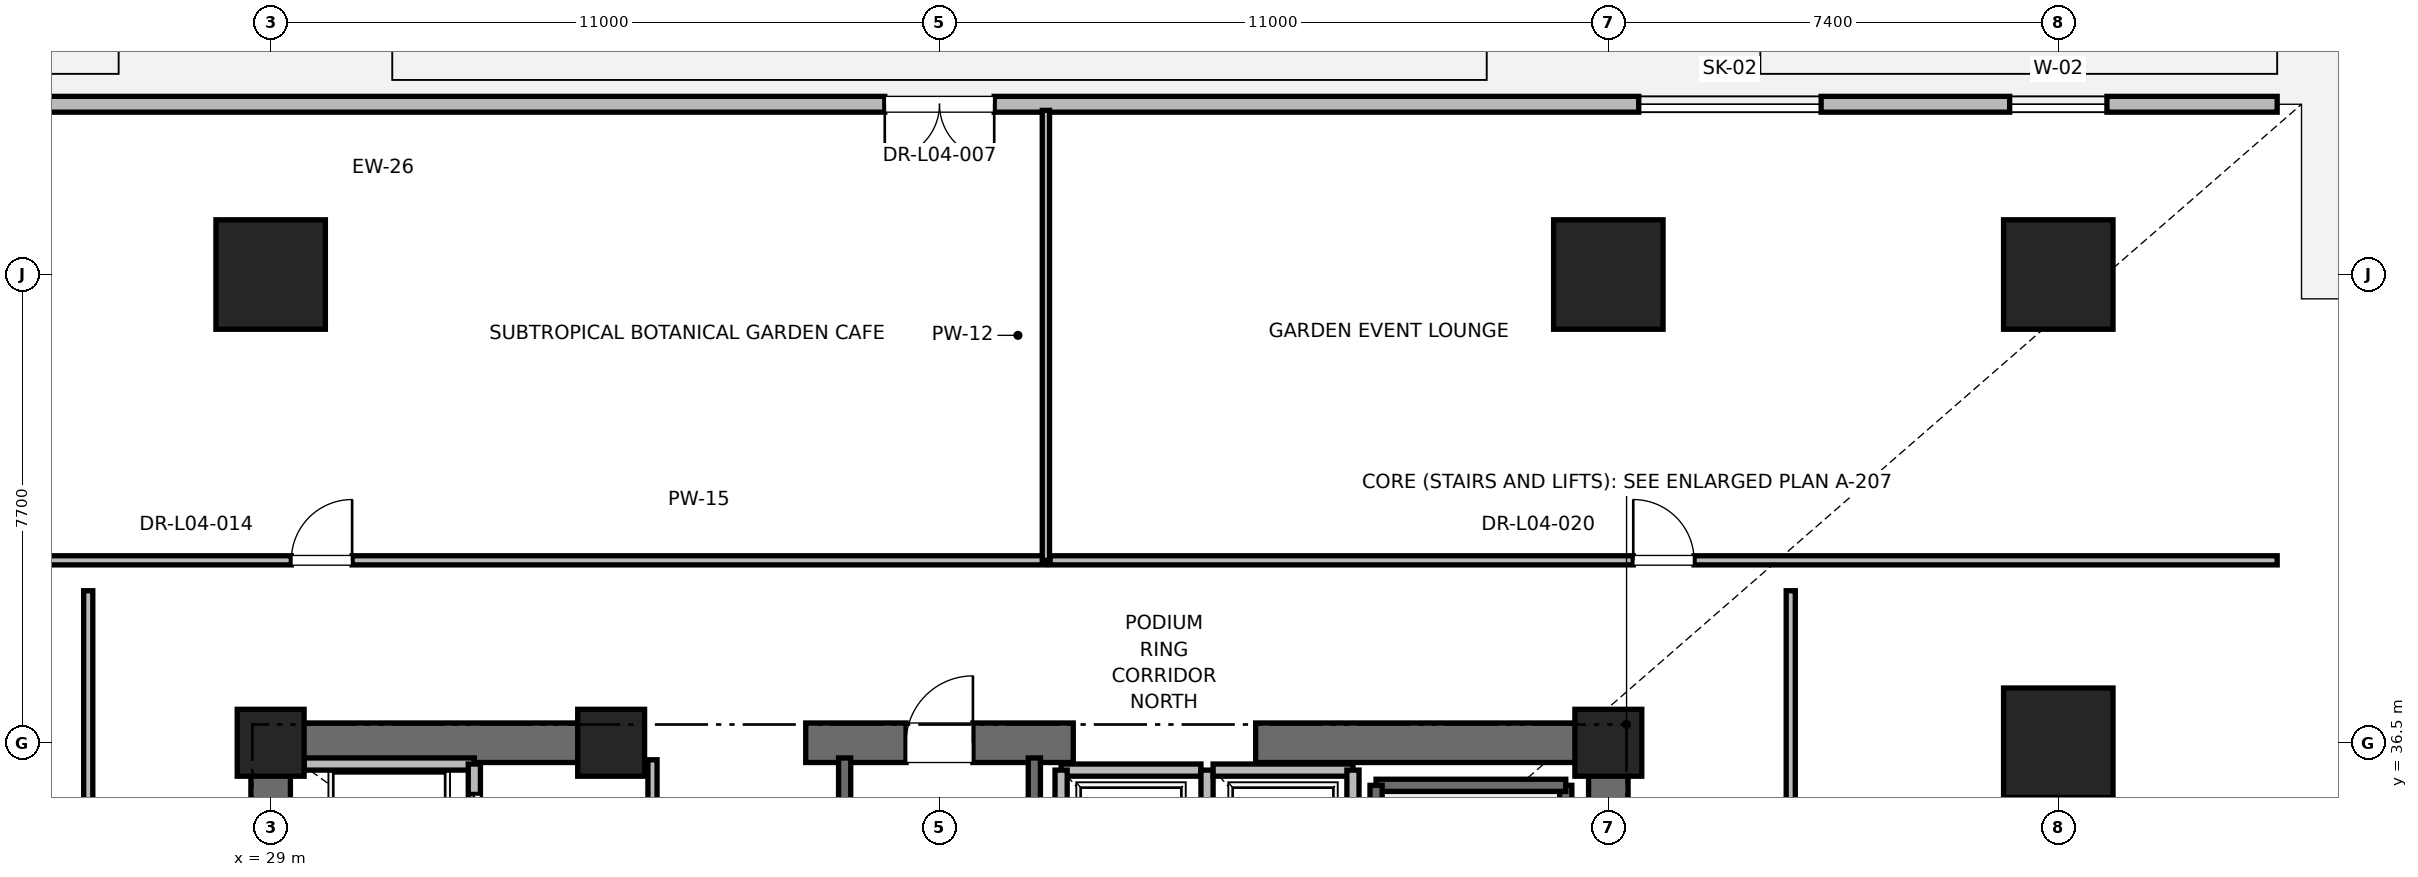
"""IFC4 building model, lengths in metres.
Left out: names, types, materials, properties, quantities, classifications, styles, units other than length and angle.
Written with IfcOpenShell. Run it as: python <this file> out.ifc"""

import sys

from ifc_helpers import new_model, si_unit, direction, frame, frame_2d, origin, origin_2d, place, context, subcontext, project, spatial, rectangle, extrude, element, fill, save


model = new_model("IFC4")
c1 = context("Model", 3, precision=1e-05, world=origin(), true_north=direction((0.0, 1.0)))
c2 = subcontext(c1, "Body", "Model", "MODEL_VIEW")
j1 = project(units=[si_unit("LENGTHUNIT", "METRE"), si_unit("PLANEANGLEUNIT", "RADIAN")], contexts=[c1])
p1 = place(None, origin())
s1 = spatial("IfcSite", under=j1, at=p1, CompositionType="ELEMENT")
p2 = place(p1, origin())
s2 = spatial("IfcBuilding", under=s1, at=p2, CompositionType="ELEMENT")
p3 = place(p2, frame((0.0, 0.0, 21.6)))
s3 = spatial("IfcBuildingStorey", under=s2, at=p3, CompositionType="ELEMENT", Elevation=21.6)
for number, where, z_axis, x_axis in (
    (1, (29.0, 44.2, 0.0), (0.0, 0.0, 1.0), (1.0, 0.0, 0.0)),
    (2, (51.0, 44.2, 0.0), (0.0, 0.0, 1.0), (1.0, 0.0, 0.0)),
    (3, (58.4, 36.5, 0.0), (0.0, 0.0, 1.0), (1.0, 0.0, 0.0)),
    (4, (58.4, 44.2, 0.0), (0.0, 0.0, 1.0), (1.0, 0.0, 0.0)),
):
    element("IfcColumn", number, at=place(p3, frame(where, z_axis=z_axis, x_axis=x_axis)), inside=s3, PredefinedType="COLUMN", context=c2, shape_type="SweptSolid", body=[
        extrude(rectangle(XDim=1.8, YDim=1.8, at=origin_2d()), origin(), (0.0, 0.0, 1.0), 6.0),
    ])
for number, where, z_axis, x_axis in (
    (5, (29.0, 36.5, 0.0), (0.0, 0.0, 1.0), (1.0, 0.0, 0.0)),
    (6, (51.0, 36.5, 0.0), (0.0, 0.0, 1.0), (1.0, 0.0, 0.0)),
    (7, (34.6, 36.5, 0.0), (0.0, 0.0, 1.0), (1.0, 0.0, 0.0)),
):
    element("IfcColumn", number, at=place(p3, frame(where, z_axis=z_axis, x_axis=x_axis)), inside=s3, PredefinedType="PILASTER", context=c2, shape_type="SweptSolid", body=[
        extrude(rectangle(XDim=1.1, YDim=1.1, at=origin_2d()), origin(), (0.0, 0.0, 1.0), 6.0),
    ])
p4 = place(p3, frame((29.0, 36.5, 0.0), z_axis=(0.0, 0.0, 1.0), x_axis=(1.0, 0.0, 0.0)))
e8 = element("IfcWall", 8, at=p4, inside=s3, PredefinedType="SHEAR", context=c2, shape_type="SweptSolid", body=[
    extrude(rectangle(XDim=5.8, YDim=0.65, at=frame_2d((2.9, 0.0))), origin(), (0.0, 0.0, 1.0), 5.76),
])
p5 = place(p3, frame((37.8, 36.5, 0.0), z_axis=(0.0, 0.0, 1.0), x_axis=(1.0, 0.0, 0.0)))
e9 = element("IfcWall", 9, at=p5, inside=s3, PredefinedType="SHEAR", context=c2, shape_type="SweptSolid", body=[
    extrude(rectangle(XDim=4.4, YDim=0.65, at=frame_2d((2.2, 0.0))), origin(), (0.0, 0.0, 1.0), 5.76),
])
p6 = place(p5, frame((1.65, 0.0, 0.0)))
e10 = element("IfcOpeningElement", 10, at=p6, cuts=e9, PredefinedType="OPENING", context=c2, shape_type="SweptSolid", body=[
    extrude(rectangle(XDim=1.1, YDim=2.15, at=frame_2d((0.55, 1.075))), frame((0.0, 0.325, 0.0), z_axis=(0.0, -1.0, 0.0), x_axis=(1.0, 0.0, 0.0)), (0.0, 0.0, 1.0), 0.65),
])
for number, where, z_axis, x_axis in (
    (11, (45.2, 36.5, 0.0), (0.0, 0.0, 1.0), (1.0, 0.0, 0.0)),
    (12, (29.0, 30.7, 0.0), (0.0, 0.0, 1.0), (0.0, 1.0, 0.0)),
):
    element("IfcWall", number, at=place(p3, frame(where, z_axis=z_axis, x_axis=x_axis)), inside=s3, PredefinedType="SHEAR", context=c2, shape_type="SweptSolid", body=[
        extrude(rectangle(XDim=5.8, YDim=0.65, at=frame_2d((2.9, 0.0))), origin(), (0.0, 0.0, 1.0), 5.76),
    ])
p7 = place(p3, frame((51.0, 27.7, 0.0), z_axis=(0.0, 0.0, 1.0), x_axis=(0.0, 1.0, 0.0)))
e13 = element("IfcWall", 13, at=p7, inside=s3, PredefinedType="SHEAR", context=c2, shape_type="SweptSolid", body=[
    extrude(rectangle(XDim=8.8, YDim=0.65, at=frame_2d((4.4, 0.0))), origin(), (0.0, 0.0, 1.0), 5.76),
])
p8 = place(p3, frame((62.0, 47.0, 0.0), z_axis=(0.0, 0.0, 1.0), x_axis=(-1.0, 0.0, 0.0)))
e14 = element("IfcWall", 14, at=p8, inside=s3, PredefinedType="PARAPET", context=c2, shape_type="SweptSolid", body=[
    extrude(rectangle(XDim=44.0, YDim=0.26, at=frame_2d((22.0, 0.0))), origin(), (0.0, 0.0, 1.0), 4.889),
])
p9 = place(p8, frame((2.8, 0.0, 0.9)))
e15 = element("IfcOpeningElement", 15, at=p9, cuts=e14, PredefinedType="OPENING", context=c2, shape_type="SweptSolid", body=[
    extrude(rectangle(XDim=1.6, YDim=2.1, at=frame_2d((0.8, 1.05))), frame((0.0, 0.13, 0.0), z_axis=(0.0, -1.0, 0.0), x_axis=(1.0, 0.0, 0.0)), (0.0, 0.0, 1.0), 0.26),
])
p10 = place(p8, frame((7.5, 0.0, 2.85)))
e16 = element("IfcOpeningElement", 16, at=p10, cuts=e14, PredefinedType="OPENING", context=c2, shape_type="SweptSolid", body=[
    extrude(rectangle(XDim=3.0, YDim=1.4, at=frame_2d((1.5, 0.7))), frame((0.0, 0.13, 0.0), z_axis=(0.0, -1.0, 0.0), x_axis=(1.0, 0.0, 0.0)), (0.0, 0.0, 1.0), 0.26),
])
p11 = place(p8, frame((21.1, 0.0, 0.0)))
e17 = element("IfcOpeningElement", 17, at=p11, cuts=e14, PredefinedType="OPENING", context=c2, shape_type="SweptSolid", body=[
    extrude(rectangle(XDim=1.8, YDim=2.4, at=frame_2d((0.9, 1.2))), frame((0.0, 0.13, 0.0), z_axis=(0.0, -1.0, 0.0), x_axis=(1.0, 0.0, 0.0)), (0.0, 0.0, 1.0), 0.26),
])
p12 = place(p8, frame((39.4, 0.0, 0.95)))
e18 = element("IfcOpeningElement", 18, at=p12, cuts=e14, PredefinedType="OPENING", context=c2, shape_type="SweptSolid", body=[
    extrude(rectangle(XDim=1.4, YDim=2.0, at=frame_2d((0.7, 1.0))), frame((0.0, 0.13, 0.0), z_axis=(0.0, -1.0, 0.0), x_axis=(1.0, 0.0, 0.0)), (0.0, 0.0, 1.0), 0.26),
])
p13 = place(p3, frame((50.3, 27.65, 0.0), z_axis=(0.0, 0.0, 1.0), x_axis=(0.0, 1.0, 0.0)))
e19 = element("IfcWall", 19, at=p13, inside=s3, PredefinedType="SOLIDWALL", context=c2, shape_type="SweptSolid", body=[
    extrude(rectangle(XDim=8.15, YDim=0.2, at=frame_2d((4.075, 0.0))), origin(), (0.0, 0.0, 1.0), 5.76),
])
p14 = place(p3, frame((47.18, 35.8, 0.0), z_axis=(0.0, 0.0, 1.0), x_axis=(1.0, 0.0, 0.0)))
e20 = element("IfcWall", 20, at=p14, inside=s3, PredefinedType="SOLIDWALL", context=c2, shape_type="SweptSolid", body=[
    extrude(rectangle(XDim=3.12, YDim=0.2, at=frame_2d((1.56, 0.0))), origin(), (0.0, 0.0, 1.0), 5.76),
])
p15 = place(p3, frame((47.18, 27.62, 0.0), z_axis=(0.0, 0.0, 1.0), x_axis=(0.0, 1.0, 0.0)))
e21 = element("IfcWall", 21, at=p15, inside=s3, PredefinedType="SOLIDWALL", context=c2, shape_type="SweptSolid", body=[
    extrude(rectangle(XDim=8.18, YDim=0.2, at=frame_2d((4.09, 0.0))), origin(), (0.0, 0.0, 1.0), 5.76),
])
p16 = place(p3, frame((38.44, 27.38, 0.0), z_axis=(0.0, 0.0, 1.0), x_axis=(0.0, 1.0, 0.0)))
e22 = element("IfcWall", 22, at=p16, inside=s3, PredefinedType="SOLIDWALL", context=c2, shape_type="SweptSolid", body=[
    extrude(rectangle(XDim=8.87, YDim=0.2, at=frame_2d((4.435, 0.0))), origin(), (0.0, 0.0, 1.0), 5.76),
])
p17 = place(p3, frame((41.56, 27.68, 0.0), z_axis=(0.0, 0.0, 1.0), x_axis=(0.0, 1.0, 0.0)))
e23 = element("IfcWall", 23, at=p17, inside=s3, PredefinedType="SOLIDWALL", context=c2, shape_type="SweptSolid", body=[
    extrude(rectangle(XDim=8.57, YDim=0.2, at=frame_2d((4.285, 0.0))), origin(), (0.0, 0.0, 1.0), 5.76),
])
p18 = place(p3, frame((32.35, 36.15, 0.0), z_axis=(0.0, 0.0, 1.0), x_axis=(-1.0, 0.0, 0.0)))
e24 = element("IfcWall", 24, at=p18, inside=s3, PredefinedType="SOLIDWALL", context=c2, shape_type="SweptSolid", body=[
    extrude(rectangle(XDim=2.8, YDim=0.2, at=frame_2d((1.4, 0.0))), origin(), (0.0, 0.0, 1.0), 4.889),
])
p19 = place(p3, frame((32.35, 34.05, 0.0), z_axis=(0.0, 0.0, 1.0), x_axis=(0.0, 1.0, 0.0)))
e25 = element("IfcWall", 25, at=p19, inside=s3, PredefinedType="SOLIDWALL", context=c2, shape_type="SweptSolid", body=[
    extrude(rectangle(XDim=2.1, YDim=0.2, at=frame_2d((1.05, 0.0))), origin(), (0.0, 0.0, 1.0), 5.76),
])
p20 = place(p19, frame((0.5, 0.0, 0.0)))
e26 = element("IfcOpeningElement", 26, at=p20, cuts=e25, PredefinedType="OPENING", context=c2, shape_type="SweptSolid", body=[
    extrude(rectangle(XDim=1.1, YDim=2.2, at=frame_2d((0.55, 1.1))), frame((0.0, 0.1, 0.0), z_axis=(0.0, -1.0, 0.0), x_axis=(1.0, 0.0, 0.0)), (0.0, 0.0, 1.0), 0.2),
])
p21 = place(p3, frame((44.3, 36.05, 0.0), z_axis=(0.0, 0.0, 1.0), x_axis=(-1.0, 0.0, 0.0)))
e27 = element("IfcWall", 27, at=p21, inside=s3, PredefinedType="SOLIDWALL", context=c2, shape_type="SweptSolid", body=[
    extrude(rectangle(XDim=2.3, YDim=0.2, at=frame_2d((1.15, 0.0))), origin(), (0.0, 0.0, 1.0), 4.54),
])
for number, where, z_axis, x_axis in (
    (28, (42.0, 36.05, 0.0), (0.0, 0.0, 1.0), (0.0, -1.0, 0.0)),
    (29, (44.4, 33.45, 0.0), (0.0, 0.0, 1.0), (0.0, 1.0, 0.0)),
):
    element("IfcWall", number, at=place(p3, frame(where, z_axis=z_axis, x_axis=x_axis)), inside=s3, PredefinedType="SOLIDWALL", context=c2, shape_type="SweptSolid", body=[
        extrude(rectangle(XDim=2.6, YDim=0.2, at=frame_2d((1.3, 0.0))), origin(), (0.0, 0.0, 1.0), 4.54),
    ])
p22 = place(p3, frame((46.8, 36.05, 0.0), z_axis=(0.0, 0.0, 1.0), x_axis=(-1.0, 0.0, 0.0)))
e30 = element("IfcWall", 30, at=p22, inside=s3, PredefinedType="SOLIDWALL", context=c2, shape_type="SweptSolid", body=[
    extrude(rectangle(XDim=2.3, YDim=0.2, at=frame_2d((1.15, 0.0))), origin(), (0.0, 0.0, 1.0), 4.54),
])
p23 = place(p3, frame((46.8, 33.45, 0.0), z_axis=(0.0, 0.0, 1.0), x_axis=(0.0, 1.0, 0.0)))
e31 = element("IfcWall", 31, at=p23, inside=s3, PredefinedType="SOLIDWALL", context=c2, shape_type="SweptSolid", body=[
    extrude(rectangle(XDim=2.6, YDim=0.2, at=frame_2d((1.3, 0.0))), origin(), (0.0, 0.0, 1.0), 5.76),
])
p24 = place(p3, frame((35.28, 33.95, 0.0), z_axis=(0.0, 0.0, 1.0), x_axis=(0.0, 1.0, 0.0)))
e32 = element("IfcWall", 32, at=p24, inside=s3, PredefinedType="PARTITIONING", context=c2, shape_type="SweptSolid", body=[
    extrude(rectangle(XDim=2.27, YDim=0.15, at=frame_2d((1.135, 0.0))), origin(), (0.0, 0.0, 1.0), 2.85),
])
p25 = place(p24, frame((0.66, 0.0, 0.0)))
e33 = element("IfcOpeningElement", 33, at=p25, cuts=e32, PredefinedType="OPENING", context=c2, shape_type="SweptSolid", body=[
    extrude(rectangle(XDim=0.95, YDim=2.15, at=frame_2d((0.475, 1.075))), frame((0.0, 0.075, 0.0), z_axis=(0.0, -1.0, 0.0), x_axis=(1.0, 0.0, 0.0)), (0.0, 0.0, 1.0), 0.15),
])
p26 = place(p3, frame((18.0, 39.5, 0.0), z_axis=(0.0, 0.0, 1.0), x_axis=(1.0, 0.0, 0.0)))
e34 = element("IfcWall", 34, at=p26, inside=s3, PredefinedType="PARTITIONING", context=c2, shape_type="SweptSolid", body=[
    extrude(rectangle(XDim=23.75, YDim=0.15, at=frame_2d((11.875, 0.0))), origin(), (0.0, 0.0, 1.0), 2.85),
])
p27 = place(p26, frame((11.34, 0.0, 0.0)))
e35 = element("IfcOpeningElement", 35, at=p27, cuts=e34, PredefinedType="OPENING", context=c2, shape_type="SweptSolid", body=[
    extrude(rectangle(XDim=1.0, YDim=2.15, at=frame_2d((0.5, 1.075))), frame((0.0, 0.075, 0.0), z_axis=(0.0, -1.0, 0.0), x_axis=(1.0, 0.0, 0.0)), (0.0, 0.0, 1.0), 0.15),
])
p28 = place(p3, frame((41.75, 39.5, 0.0), z_axis=(0.0, 0.0, 1.0), x_axis=(0.0, 1.0, 0.0)))
e36 = element("IfcWall", 36, at=p28, inside=s3, PredefinedType="PARTITIONING", context=c2, shape_type="SweptSolid", body=[
    extrude(rectangle(XDim=7.4, YDim=0.12, at=frame_2d((3.7, 0.0))), origin(), (0.0, 0.0, 1.0), 2.85),
])
p29 = place(p3, frame((41.82, 39.5, 0.0), z_axis=(0.0, 0.0, 1.0), x_axis=(1.0, 0.0, 0.0)))
e37 = element("IfcWall", 37, at=p29, inside=s3, PredefinedType="PARTITIONING", context=c2, shape_type="SweptSolid", body=[
    extrude(rectangle(XDim=20.18, YDim=0.15, at=frame_2d((10.09, 0.0))), origin(), (0.0, 0.0, 1.0), 2.85),
])
p30 = place(p29, frame((9.59, 0.0, 0.0)))
e38 = element("IfcOpeningElement", 38, at=p30, cuts=e37, PredefinedType="OPENING", context=c2, shape_type="SweptSolid", body=[
    extrude(rectangle(XDim=1.0, YDim=2.15, at=frame_2d((0.5, 1.075))), frame((0.0, 0.075, 0.0), z_axis=(0.0, -1.0, 0.0), x_axis=(1.0, 0.0, 0.0)), (0.0, 0.0, 1.0), 0.15),
])
p31 = place(p3, frame((26.0, 16.0, 0.0), z_axis=(0.0, 0.0, 1.0), x_axis=(0.0, 1.0, 0.0)))
e39 = element("IfcWall", 39, at=p31, inside=s3, PredefinedType="PARTITIONING", context=c2, shape_type="SweptSolid", body=[
    extrude(rectangle(XDim=23.0, YDim=0.15, at=frame_2d((11.5, 0.0))), origin(), (0.0, 0.0, 1.0), 2.85),
])
p32 = place(p31, frame((11.0, 0.0, 0.0)))
e40 = element("IfcOpeningElement", 40, at=p32, cuts=e39, PredefinedType="OPENING", context=c2, shape_type="SweptSolid", body=[
    extrude(rectangle(XDim=1.0, YDim=2.15, at=frame_2d((0.5, 1.075))), frame((0.0, 0.075, 0.0), z_axis=(0.0, -1.0, 0.0), x_axis=(1.0, 0.0, 0.0)), (0.0, 0.0, 1.0), 0.15),
])
p33 = place(p3, frame((54.0, 16.0, 0.0), z_axis=(0.0, 0.0, 1.0), x_axis=(0.0, 1.0, 0.0)))
e41 = element("IfcWall", 41, at=p33, inside=s3, PredefinedType="PARTITIONING", context=c2, shape_type="SweptSolid", body=[
    extrude(rectangle(XDim=23.0, YDim=0.15, at=frame_2d((11.5, 0.0))), origin(), (0.0, 0.0, 1.0), 2.85),
])
p34 = place(p33, frame((11.0, 0.0, 0.0)))
e42 = element("IfcOpeningElement", 42, at=p34, cuts=e41, PredefinedType="OPENING", context=c2, shape_type="SweptSolid", body=[
    extrude(rectangle(XDim=1.0, YDim=2.15, at=frame_2d((0.5, 1.075))), frame((0.0, 0.075, 0.0), z_axis=(0.0, -1.0, 0.0), x_axis=(1.0, 0.0, 0.0)), (0.0, 0.0, 1.0), 0.15),
])
p35 = place(p9, origin())
e43 = element("IfcWindow", 43, at=p35, inside=s3, PartitioningType="SINGLE_PANEL", PredefinedType="WINDOW", context=c2, shape_type="SweptSolid", body=[
    extrude(rectangle(XDim=1.6, YDim=2.1, at=frame_2d((0.8, 1.05))), frame((0.0, 0.03, 0.0), z_axis=(0.0, -1.0, 0.0), x_axis=(1.0, 0.0, 0.0)), (0.0, 0.0, 1.0), 0.06),
])
fill(e15, e43)
p36 = place(p10, origin())
e44 = element("IfcWindow", 44, at=p36, inside=s3, PartitioningType="SINGLE_PANEL", PredefinedType="SKYLIGHT", context=c2, shape_type="SweptSolid", body=[
    extrude(rectangle(XDim=3.0, YDim=1.4, at=frame_2d((1.5, 0.7))), frame((0.0, 0.03, 0.0), z_axis=(0.0, -1.0, 0.0), x_axis=(1.0, 0.0, 0.0)), (0.0, 0.0, 1.0), 0.06),
])
fill(e16, e44)
p37 = place(p11, origin())
e45 = element("IfcDoor", 45, at=p37, inside=s3, OperationType="DOUBLE_DOOR_SINGLE_SWING", PredefinedType="DOOR", context=c2, shape_type="SweptSolid", body=[
    extrude(rectangle(XDim=1.8, YDim=2.4, at=frame_2d((0.9, 1.2))), frame((0.0, 0.025, 0.0), z_axis=(0.0, -1.0, 0.0), x_axis=(1.0, 0.0, 0.0)), (0.0, 0.0, 1.0), 0.05),
])
fill(e17, e45)
p38 = place(p6, origin())
e46 = element("IfcDoor", 46, at=p38, inside=s3, OperationType="SINGLE_SWING_RIGHT", PredefinedType="DOOR", context=c2, shape_type="SweptSolid", body=[
    extrude(rectangle(XDim=1.1, YDim=2.15, at=frame_2d((0.55, 1.075))), frame((0.0, 0.025, 0.0), z_axis=(0.0, -1.0, 0.0), x_axis=(1.0, 0.0, 0.0)), (0.0, 0.0, 1.0), 0.05),
])
fill(e10, e46)
p39 = place(p20, origin())
e47 = element("IfcDoor", 47, at=p39, inside=s3, OperationType="SLIDING_TO_RIGHT", PredefinedType="DOOR", context=c2, shape_type="SweptSolid", body=[
    extrude(rectangle(XDim=1.1, YDim=2.2, at=frame_2d((0.55, 1.1))), frame((0.0, 0.025, 0.0), z_axis=(0.0, -1.0, 0.0), x_axis=(1.0, 0.0, 0.0)), (0.0, 0.0, 1.0), 0.05),
])
fill(e26, e47)
p40 = place(p27, origin())
e48 = element("IfcDoor", 48, at=p40, inside=s3, OperationType="SINGLE_SWING_RIGHT", PredefinedType="DOOR", context=c2, shape_type="SweptSolid", body=[
    extrude(rectangle(XDim=1.0, YDim=2.15, at=frame_2d((0.5, 1.075))), frame((0.0, 0.025, 0.0), z_axis=(0.0, -1.0, 0.0), x_axis=(1.0, 0.0, 0.0)), (0.0, 0.0, 1.0), 0.05),
])
fill(e35, e48)
p41 = place(p30, origin())
e49 = element("IfcDoor", 49, at=p41, inside=s3, OperationType="SINGLE_SWING_LEFT", PredefinedType="DOOR", context=c2, shape_type="SweptSolid", body=[
    extrude(rectangle(XDim=1.0, YDim=2.15, at=frame_2d((0.5, 1.075))), frame((0.0, 0.025, 0.0), z_axis=(0.0, -1.0, 0.0), x_axis=(1.0, 0.0, 0.0)), (0.0, 0.0, 1.0), 0.05),
])
fill(e38, e49)
save(model, sys.argv[1])
